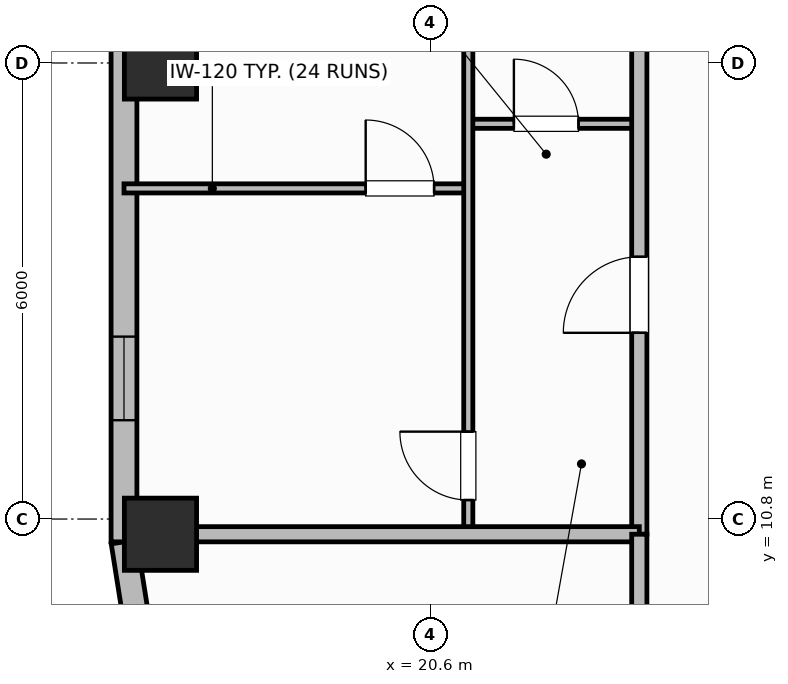
"""IFC4 building model, lengths in metres.
Left out: names, types, materials, properties, quantities, classifications, styles, units other than length and angle.
Written with IfcOpenShell. Run it as: python <this file> out.ifc"""

import sys

from ifc_helpers import new_model, si_unit, direction, frame, frame_2d, origin, origin_2d, place, context, subcontext, project, spatial, rectangle, extrude, element, fill, save


model = new_model("IFC4")
c1 = context("Model", 3, precision=1e-05, world=origin(), true_north=direction((0.0, 1.0)))
c2 = subcontext(c1, "Body", "Model", "MODEL_VIEW")
j1 = project(units=[si_unit("LENGTHUNIT", "METRE"), si_unit("PLANEANGLEUNIT", "RADIAN")], contexts=[c1])
p1 = place(None, origin())
s1 = spatial("IfcSite", under=j1, at=p1, CompositionType="ELEMENT")
p2 = place(p1, origin())
s2 = spatial("IfcBuilding", under=s1, at=p2, CompositionType="ELEMENT")
p3 = place(p2, frame((0.0, 0.0, 155.2)))
s3 = spatial("IfcBuildingStorey", under=s2, at=p3, CompositionType="ELEMENT", Elevation=155.2)
for number, where, z_axis, x_axis in (
    (1, (17.05, 10.6, 0.0), (0.0, 0.0, 1.0), (1.0, 0.0, 0.0)),
    (2, (17.05, 16.8, 0.0), (0.0, 0.0, 1.0), (1.0, 0.0, 0.0)),
):
    element("IfcColumn", number, at=place(p3, frame(where, z_axis=z_axis, x_axis=x_axis)), inside=s3, PredefinedType="COLUMN", context=c2, shape_type="SweptSolid", body=[
        extrude(rectangle(XDim=0.95, YDim=0.95, at=origin_2d()), origin(), (0.0, 0.0, 1.0), 3.7),
    ])
p4 = place(p3, frame((16.57, 10.5, 0.0), z_axis=(0.0, 0.0, 1.0), x_axis=(0.156514556949, -0.987675651954, 0.0)))
e3 = element("IfcWall", 3, at=p4, inside=s3, PredefinedType="SOLIDWALL", context=c2, shape_type="SweptSolid", body=[
    extrude(rectangle(XDim=1.135, YDim=0.34, at=frame_2d((0.568, 0.0))), origin(), (0.0, 0.0, 1.0), 2.72),
])
p5 = place(p3, frame((16.57, 23.8, 0.0), z_axis=(0.0, 0.0, 1.0), x_axis=(0.0, -1.0, 0.0)))
e4 = element("IfcWall", 4, at=p5, inside=s3, PredefinedType="SOLIDWALL", context=c2, shape_type="SweptSolid", body=[
    extrude(rectangle(XDim=13.3, YDim=0.34, at=frame_2d((6.65, 0.0))), origin(), (0.0, 0.0, 1.0), 2.72),
])
p6 = place(p5, frame((1.7, 0.0, 0.0)))
e5 = element("IfcOpeningElement", 5, at=p6, cuts=e4, PredefinedType="OPENING", context=c2, shape_type="SweptSolid", body=[
    extrude(rectangle(XDim=1.6, YDim=2.1, at=frame_2d((0.8, 1.05))), frame((0.0, 0.18, 0.0), z_axis=(0.0, -1.0, 0.0), x_axis=(1.0, 0.0, 0.0)), (0.0, 0.0, 1.0), 0.36),
])
p7 = place(p5, frame((4.6, 0.0, 0.95)))
e6 = element("IfcOpeningElement", 6, at=p7, cuts=e4, PredefinedType="OPENING", context=c2, shape_type="SweptSolid", body=[
    extrude(rectangle(XDim=1.1, YDim=1.65, at=frame_2d((0.55, 0.825))), frame((0.0, 0.18, 0.0), z_axis=(0.0, -1.0, 0.0), x_axis=(1.0, 0.0, 0.0)), (0.0, 0.0, 1.0), 0.36),
])
p8 = place(p5, frame((10.6, 0.0, 0.95)))
e7 = element("IfcOpeningElement", 7, at=p8, cuts=e4, PredefinedType="OPENING", context=c2, shape_type="SweptSolid", body=[
    extrude(rectangle(XDim=1.1, YDim=1.65, at=frame_2d((0.55, 0.825))), frame((0.0, 0.18, 0.0), z_axis=(0.0, -1.0, 0.0), x_axis=(1.0, 0.0, 0.0)), (0.0, 0.0, 1.0), 0.36),
])
p9 = place(p3, frame((21.1, 16.0, 0.0), z_axis=(0.0, 0.0, 1.0), x_axis=(1.0, 0.0, 0.0)))
e8 = element("IfcWall", 8, at=p9, inside=s3, PredefinedType="PARTITIONING", context=c2, shape_type="SweptSolid", body=[
    extrude(rectangle(XDim=2.25, YDim=0.12, at=frame_2d((1.125, 0.0))), origin(), (0.0, 0.0, 1.0), 2.55),
])
p10 = place(p9, frame((0.6, 0.0, 0.0)))
e9 = element("IfcOpeningElement", 9, at=p10, cuts=e8, PredefinedType="OPENING", context=c2, shape_type="SweptSolid", body=[
    extrude(rectangle(XDim=0.85, YDim=2.1, at=frame_2d((0.425, 1.05))), frame((0.0, 0.07, 0.0), z_axis=(0.0, -1.0, 0.0), x_axis=(1.0, 0.0, 0.0)), (0.0, 0.0, 1.0), 0.14),
])
p11 = place(p3, frame((16.57, 15.15, 0.0), z_axis=(0.0, 0.0, 1.0), x_axis=(1.0, 0.0, 0.0)))
e10 = element("IfcWall", 10, at=p11, inside=s3, PredefinedType="PARTITIONING", context=c2, shape_type="SweptSolid", body=[
    extrude(rectangle(XDim=4.53, YDim=0.12, at=frame_2d((2.265, 0.0))), origin(), (0.0, 0.0, 1.0), 2.55),
])
p12 = place(p11, frame((3.18, 0.0, 0.0)))
e11 = element("IfcOpeningElement", 11, at=p12, cuts=e10, PredefinedType="OPENING", context=c2, shape_type="SweptSolid", body=[
    extrude(rectangle(XDim=0.9, YDim=2.1, at=frame_2d((0.45, 1.05))), frame((0.0, 0.07, 0.0), z_axis=(0.0, -1.0, 0.0), x_axis=(1.0, 0.0, 0.0)), (0.0, 0.0, 1.0), 0.14),
])
p13 = place(p3, frame((21.1, 10.64, 0.0), z_axis=(0.0, 0.0, 1.0), x_axis=(0.0, 1.0, 0.0)))
e12 = element("IfcWall", 12, at=p13, inside=s3, PredefinedType="PARTITIONING", context=c2, shape_type="SweptSolid", body=[
    extrude(rectangle(XDim=12.02, YDim=0.12, at=frame_2d((6.01, 0.0))), origin(), (0.0, 0.0, 1.0), 2.55),
])
p14 = place(p13, frame((0.41, 0.0, 0.0)))
e13 = element("IfcOpeningElement", 13, at=p14, cuts=e12, PredefinedType="OPENING", context=c2, shape_type="SweptSolid", body=[
    extrude(rectangle(XDim=0.9, YDim=2.1, at=frame_2d((0.45, 1.05))), frame((0.0, 0.07, 0.0), z_axis=(0.0, -1.0, 0.0), x_axis=(1.0, 0.0, 0.0)), (0.0, 0.0, 1.0), 0.14),
])
p15 = place(p13, frame((10.185, 0.0, 0.0)))
e14 = element("IfcOpeningElement", 14, at=p15, cuts=e12, PredefinedType="OPENING", context=c2, shape_type="SweptSolid", body=[
    extrude(rectangle(XDim=0.82, YDim=2.08, at=frame_2d((0.41, 1.04))), frame((0.0, 0.07, 0.0), z_axis=(0.0, -1.0, 0.0), x_axis=(1.0, 0.0, 0.0)), (0.0, 0.0, 1.0), 0.14),
])
p16 = place(p3, frame((23.35, 10.6, 0.0), z_axis=(0.0, 0.0, 1.0), x_axis=(0.0, 1.0, 0.0)))
e15 = element("IfcWall", 15, at=p16, inside=s3, PredefinedType="PARTITIONING", context=c2, shape_type="SweptSolid", body=[
    extrude(rectangle(XDim=35.2, YDim=0.2, at=frame_2d((17.6, 0.0))), origin(), (0.0, 0.0, 1.0), 2.55),
])
p17 = place(p16, frame((2.65, 0.0, 0.0)))
e16 = element("IfcOpeningElement", 16, at=p17, cuts=e15, PredefinedType="OPENING", context=c2, shape_type="SweptSolid", body=[
    extrude(rectangle(XDim=1.0, YDim=2.15, at=frame_2d((0.5, 1.075))), frame((0.0, 0.11, 0.0), z_axis=(0.0, -1.0, 0.0), x_axis=(1.0, 0.0, 0.0)), (0.0, 0.0, 1.0), 0.22),
])
p18 = place(p16, frame((12.65, 0.0, 0.0)))
e17 = element("IfcOpeningElement", 17, at=p18, cuts=e15, PredefinedType="OPENING", context=c2, shape_type="SweptSolid", body=[
    extrude(rectangle(XDim=1.0, YDim=2.15, at=frame_2d((0.5, 1.075))), frame((0.0, 0.11, 0.0), z_axis=(0.0, -1.0, 0.0), x_axis=(1.0, 0.0, 0.0)), (0.0, 0.0, 1.0), 0.22),
])
p19 = place(p16, frame((23.782, 0.0, 0.0)))
e18 = element("IfcOpeningElement", 18, at=p19, cuts=e15, PredefinedType="OPENING", context=c2, shape_type="SweptSolid", body=[
    extrude(rectangle(XDim=1.0, YDim=2.15, at=frame_2d((0.5, 1.075))), frame((0.0, 0.11, 0.0), z_axis=(0.0, -1.0, 0.0), x_axis=(1.0, 0.0, 0.0)), (0.0, 0.0, 1.0), 0.22),
])
p20 = place(p3, frame((16.99, 10.6, 0.0), z_axis=(0.0, 0.0, 1.0), x_axis=(1.0, 0.0, 0.0)))
e19 = element("IfcWall", 19, at=p20, inside=s3, PredefinedType="PARTITIONING", context=c2, shape_type="SweptSolid", body=[
    extrude(rectangle(XDim=6.36, YDim=0.2, at=frame_2d((3.18, 0.0))), origin(), (0.0, 0.0, 1.0), 2.55),
])
p21 = place(p3, frame((23.35, 6.87, 0.0), z_axis=(0.0, 0.0, 1.0), x_axis=(0.0, 1.0, 0.0)))
e20 = element("IfcWall", 20, at=p21, inside=s3, PredefinedType="PARTITIONING", context=c2, shape_type="SweptSolid", body=[
    extrude(rectangle(XDim=3.73, YDim=0.2, at=frame_2d((1.865, 0.0))), origin(), (0.0, 0.0, 1.0), 2.55),
])
p22 = place(p8, origin())
e21 = element("IfcWindow", 21, at=p22, inside=s3, PartitioningType="SINGLE_PANEL", PredefinedType="WINDOW", context=c2, shape_type="SweptSolid", body=[
    extrude(rectangle(XDim=1.1, YDim=1.65, at=frame_2d((0.55, 0.825))), frame((0.0, 0.03, 0.0), z_axis=(0.0, -1.0, 0.0), x_axis=(1.0, 0.0, 0.0)), (0.0, 0.0, 1.0), 0.06),
])
fill(e7, e21)
p23 = place(p10, origin())
e22 = element("IfcDoor", 22, at=p23, inside=s3, OperationType="SINGLE_SWING_LEFT", PredefinedType="DOOR", context=c2, shape_type="SweptSolid", body=[
    extrude(rectangle(XDim=0.85, YDim=2.1, at=frame_2d((0.425, 1.05))), frame((0.0, 0.025, 0.0), z_axis=(0.0, -1.0, 0.0), x_axis=(1.0, 0.0, 0.0)), (0.0, 0.0, 1.0), 0.05),
])
fill(e9, e22)
p24 = place(p12, origin())
e23 = element("IfcDoor", 23, at=p24, inside=s3, OperationType="SINGLE_SWING_LEFT", PredefinedType="DOOR", context=c2, shape_type="SweptSolid", body=[
    extrude(rectangle(XDim=0.9, YDim=2.1, at=frame_2d((0.45, 1.05))), frame((0.0, 0.025, 0.0), z_axis=(0.0, -1.0, 0.0), x_axis=(1.0, 0.0, 0.0)), (0.0, 0.0, 1.0), 0.05),
])
fill(e11, e23)
p25 = place(p14, origin())
e24 = element("IfcDoor", 24, at=p25, inside=s3, OperationType="SINGLE_SWING_RIGHT", PredefinedType="DOOR", context=c2, shape_type="SweptSolid", body=[
    extrude(rectangle(XDim=0.9, YDim=2.1, at=frame_2d((0.45, 1.05))), frame((0.0, 0.025, 0.0), z_axis=(0.0, -1.0, 0.0), x_axis=(1.0, 0.0, 0.0)), (0.0, 0.0, 1.0), 0.05),
])
fill(e13, e24)
p26 = place(p17, origin())
e25 = element("IfcDoor", 25, at=p26, inside=s3, OperationType="SINGLE_SWING_LEFT", PredefinedType="DOOR", context=c2, shape_type="SweptSolid", body=[
    extrude(rectangle(XDim=1.0, YDim=2.15, at=frame_2d((0.5, 1.075))), frame((0.0, 0.025, 0.0), z_axis=(0.0, -1.0, 0.0), x_axis=(1.0, 0.0, 0.0)), (0.0, 0.0, 1.0), 0.05),
])
fill(e16, e25)
save(model, sys.argv[1])
